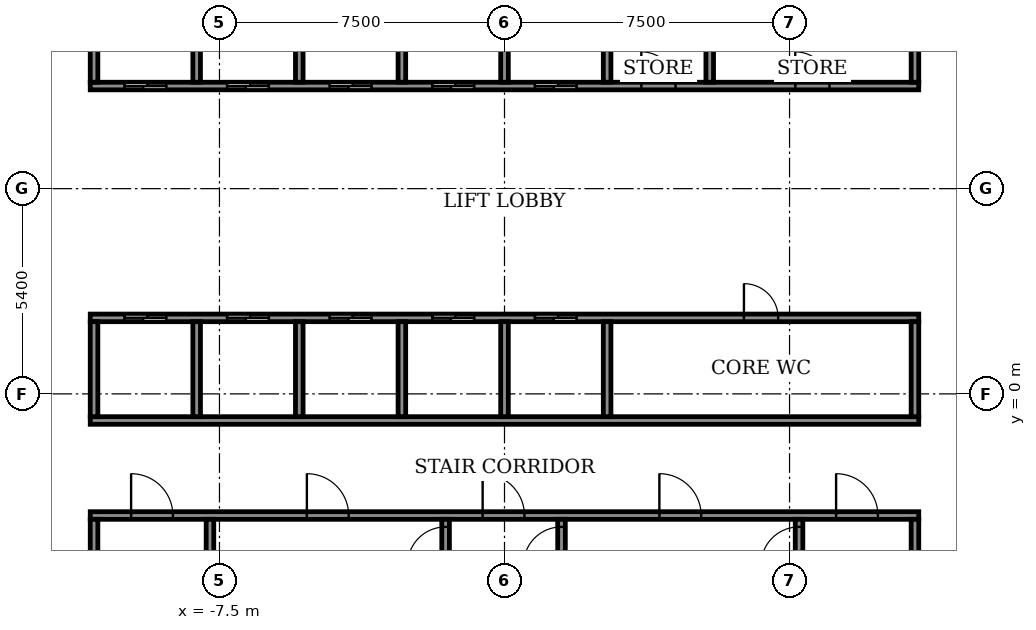
"""IFC4 building model, lengths in metres.
Left out: names, types, materials, properties, quantities, classifications, styles, units other than length and angle.
Written with IfcOpenShell. Run it as: python <this file> out.ifc"""

import sys

from ifc_helpers import new_model, si_unit, direction, frame, frame_2d, origin, place, context, subcontext, project, spatial, rectangle, extrude, element, fill, save


model = new_model("IFC4")
c1 = context("Model", 3, precision=1e-05, world=origin(), true_north=direction((0.0, 1.0)))
c2 = subcontext(c1, "Body", "Model", "MODEL_VIEW")
j1 = project(units=[si_unit("LENGTHUNIT", "METRE"), si_unit("PLANEANGLEUNIT", "RADIAN")], contexts=[c1])
p1 = place(None, origin())
s1 = spatial("IfcSite", under=j1, at=p1, CompositionType="ELEMENT")
p2 = place(p1, origin())
s2 = spatial("IfcBuilding", under=s1, at=p2, CompositionType="ELEMENT")
p3 = place(p2, frame((0.0, 0.0, 74.7)))
s3 = spatial("IfcBuildingStorey", under=s2, at=p3, CompositionType="ELEMENT", Elevation=74.7)
p4 = place(p3, frame((-10.9, -3.2, 0.0), z_axis=(0.0, 0.0, 1.0), x_axis=(1.0, 0.0, 0.0)))
e1 = element("IfcWall", 1, at=p4, inside=s3, PredefinedType="SHEAR", context=c2, shape_type="SweptSolid", body=[
    extrude(rectangle(XDim=21.8, YDim=0.2, at=frame_2d((10.9, 0.0))), origin(), (0.0, 0.0, 1.0), 4.05),
])
p5 = place(p4, frame((1.075, 0.0, 0.0)))
e2 = element("IfcOpeningElement", 2, at=p5, cuts=e1, PredefinedType="OPENING", context=c2, shape_type="SweptSolid", body=[
    extrude(rectangle(XDim=1.1, YDim=2.1, at=frame_2d((0.55, 1.05))), frame((0.0, 0.11, 0.0), z_axis=(0.0, -1.0, 0.0), x_axis=(1.0, 0.0, 0.0)), (0.0, 0.0, 1.0), 0.22),
])
p6 = place(p4, frame((10.325, 0.0, 0.0)))
e3 = element("IfcOpeningElement", 3, at=p6, cuts=e1, PredefinedType="OPENING", context=c2, shape_type="SweptSolid", body=[
    extrude(rectangle(XDim=1.1, YDim=2.1, at=frame_2d((0.55, 1.05))), frame((0.0, 0.11, 0.0), z_axis=(0.0, -1.0, 0.0), x_axis=(1.0, 0.0, 0.0)), (0.0, 0.0, 1.0), 0.22),
])
p7 = place(p4, frame((19.625, 0.0, 0.0)))
e4 = element("IfcOpeningElement", 4, at=p7, cuts=e1, PredefinedType="OPENING", context=c2, shape_type="SweptSolid", body=[
    extrude(rectangle(XDim=1.1, YDim=2.1, at=frame_2d((0.55, 1.05))), frame((0.0, 0.11, 0.0), z_axis=(0.0, -1.0, 0.0), x_axis=(1.0, 0.0, 0.0)), (0.0, 0.0, 1.0), 0.22),
])
p8 = place(p4, frame((5.7, 0.0, 0.0)))
e5 = element("IfcOpeningElement", 5, at=p8, cuts=e1, PredefinedType="OPENING", context=c2, shape_type="SweptSolid", body=[
    extrude(rectangle(XDim=1.1, YDim=2.1, at=frame_2d((0.55, 1.05))), frame((0.0, 0.11, 0.0), z_axis=(0.0, -1.0, 0.0), x_axis=(1.0, 0.0, 0.0)), (0.0, 0.0, 1.0), 0.22),
])
p9 = place(p4, frame((14.975, 0.0, 0.0)))
e6 = element("IfcOpeningElement", 6, at=p9, cuts=e1, PredefinedType="OPENING", context=c2, shape_type="SweptSolid", body=[
    extrude(rectangle(XDim=1.1, YDim=2.1, at=frame_2d((0.55, 1.05))), frame((0.0, 0.11, 0.0), z_axis=(0.0, -1.0, 0.0), x_axis=(1.0, 0.0, 0.0)), (0.0, 0.0, 1.0), 0.22),
])
p10 = place(p3, frame((-10.9, -0.7, 0.0), z_axis=(0.0, 0.0, 1.0), x_axis=(1.0, 0.0, 0.0)))
e7 = element("IfcWall", 7, at=p10, inside=s3, PredefinedType="SHEAR", context=c2, shape_type="SweptSolid", body=[
    extrude(rectangle(XDim=21.8, YDim=0.2, at=frame_2d((10.9, 0.0))), origin(), (0.0, 0.0, 1.0), 4.05),
])
p11 = place(p3, frame((-10.9, 2.0, 0.0), z_axis=(0.0, 0.0, 1.0), x_axis=(1.0, 0.0, 0.0)))
e8 = element("IfcWall", 8, at=p11, inside=s3, PredefinedType="SHEAR", context=c2, shape_type="SweptSolid", body=[
    extrude(rectangle(XDim=21.8, YDim=0.2, at=frame_2d((10.9, 0.0))), origin(), (0.0, 0.0, 1.0), 4.05),
])
p12 = place(p11, frame((0.9, 0.0, 0.0)))
e9 = element("IfcOpeningElement", 9, at=p12, cuts=e8, PredefinedType="OPENING", context=c2, shape_type="SweptSolid", body=[
    extrude(rectangle(XDim=1.1, YDim=2.1, at=frame_2d((0.55, 1.05))), frame((0.0, 0.11, 0.0), z_axis=(0.0, -1.0, 0.0), x_axis=(1.0, 0.0, 0.0)), (0.0, 0.0, 1.0), 0.22),
])
p13 = place(p11, frame((3.6, 0.0, 0.0)))
e10 = element("IfcOpeningElement", 10, at=p13, cuts=e8, PredefinedType="OPENING", context=c2, shape_type="SweptSolid", body=[
    extrude(rectangle(XDim=1.1, YDim=2.1, at=frame_2d((0.55, 1.05))), frame((0.0, 0.11, 0.0), z_axis=(0.0, -1.0, 0.0), x_axis=(1.0, 0.0, 0.0)), (0.0, 0.0, 1.0), 0.22),
])
p14 = place(p11, frame((6.3, 0.0, 0.0)))
e11 = element("IfcOpeningElement", 11, at=p14, cuts=e8, PredefinedType="OPENING", context=c2, shape_type="SweptSolid", body=[
    extrude(rectangle(XDim=1.1, YDim=2.1, at=frame_2d((0.55, 1.05))), frame((0.0, 0.11, 0.0), z_axis=(0.0, -1.0, 0.0), x_axis=(1.0, 0.0, 0.0)), (0.0, 0.0, 1.0), 0.22),
])
p15 = place(p11, frame((9.0, 0.0, 0.0)))
e12 = element("IfcOpeningElement", 12, at=p15, cuts=e8, PredefinedType="OPENING", context=c2, shape_type="SweptSolid", body=[
    extrude(rectangle(XDim=1.1, YDim=2.1, at=frame_2d((0.55, 1.05))), frame((0.0, 0.11, 0.0), z_axis=(0.0, -1.0, 0.0), x_axis=(1.0, 0.0, 0.0)), (0.0, 0.0, 1.0), 0.22),
])
p16 = place(p11, frame((11.7, 0.0, 0.0)))
e13 = element("IfcOpeningElement", 13, at=p16, cuts=e8, PredefinedType="OPENING", context=c2, shape_type="SweptSolid", body=[
    extrude(rectangle(XDim=1.1, YDim=2.1, at=frame_2d((0.55, 1.05))), frame((0.0, 0.11, 0.0), z_axis=(0.0, -1.0, 0.0), x_axis=(1.0, 0.0, 0.0)), (0.0, 0.0, 1.0), 0.22),
])
p17 = place(p11, frame((17.2, 0.0, 0.0)))
e14 = element("IfcOpeningElement", 14, at=p17, cuts=e8, PredefinedType="OPENING", context=c2, shape_type="SweptSolid", body=[
    extrude(rectangle(XDim=0.9, YDim=2.1, at=frame_2d((0.45, 1.05))), frame((0.0, 0.11, 0.0), z_axis=(0.0, -1.0, 0.0), x_axis=(1.0, 0.0, 0.0)), (0.0, 0.0, 1.0), 0.22),
])
p18 = place(p3, frame((-10.9, 8.1, 0.0), z_axis=(0.0, 0.0, 1.0), x_axis=(1.0, 0.0, 0.0)))
e15 = element("IfcWall", 15, at=p18, inside=s3, PredefinedType="SHEAR", context=c2, shape_type="SweptSolid", body=[
    extrude(rectangle(XDim=21.8, YDim=0.2, at=frame_2d((10.9, 0.0))), origin(), (0.0, 0.0, 1.0), 4.05),
])
p19 = place(p18, frame((0.9, 0.0, 0.0)))
e16 = element("IfcOpeningElement", 16, at=p19, cuts=e15, PredefinedType="OPENING", context=c2, shape_type="SweptSolid", body=[
    extrude(rectangle(XDim=1.1, YDim=2.1, at=frame_2d((0.55, 1.05))), frame((0.0, 0.11, 0.0), z_axis=(0.0, -1.0, 0.0), x_axis=(1.0, 0.0, 0.0)), (0.0, 0.0, 1.0), 0.22),
])
p20 = place(p18, frame((3.6, 0.0, 0.0)))
e17 = element("IfcOpeningElement", 17, at=p20, cuts=e15, PredefinedType="OPENING", context=c2, shape_type="SweptSolid", body=[
    extrude(rectangle(XDim=1.1, YDim=2.1, at=frame_2d((0.55, 1.05))), frame((0.0, 0.11, 0.0), z_axis=(0.0, -1.0, 0.0), x_axis=(1.0, 0.0, 0.0)), (0.0, 0.0, 1.0), 0.22),
])
p21 = place(p18, frame((6.3, 0.0, 0.0)))
e18 = element("IfcOpeningElement", 18, at=p21, cuts=e15, PredefinedType="OPENING", context=c2, shape_type="SweptSolid", body=[
    extrude(rectangle(XDim=1.1, YDim=2.1, at=frame_2d((0.55, 1.05))), frame((0.0, 0.11, 0.0), z_axis=(0.0, -1.0, 0.0), x_axis=(1.0, 0.0, 0.0)), (0.0, 0.0, 1.0), 0.22),
])
p22 = place(p18, frame((9.0, 0.0, 0.0)))
e19 = element("IfcOpeningElement", 19, at=p22, cuts=e15, PredefinedType="OPENING", context=c2, shape_type="SweptSolid", body=[
    extrude(rectangle(XDim=1.1, YDim=2.1, at=frame_2d((0.55, 1.05))), frame((0.0, 0.11, 0.0), z_axis=(0.0, -1.0, 0.0), x_axis=(1.0, 0.0, 0.0)), (0.0, 0.0, 1.0), 0.22),
])
p23 = place(p18, frame((11.7, 0.0, 0.0)))
e20 = element("IfcOpeningElement", 20, at=p23, cuts=e15, PredefinedType="OPENING", context=c2, shape_type="SweptSolid", body=[
    extrude(rectangle(XDim=1.1, YDim=2.1, at=frame_2d((0.55, 1.05))), frame((0.0, 0.11, 0.0), z_axis=(0.0, -1.0, 0.0), x_axis=(1.0, 0.0, 0.0)), (0.0, 0.0, 1.0), 0.22),
])
p24 = place(p18, frame((14.5, 0.0, 0.0)))
e21 = element("IfcOpeningElement", 21, at=p24, cuts=e15, PredefinedType="OPENING", context=c2, shape_type="SweptSolid", body=[
    extrude(rectangle(XDim=0.9, YDim=2.1, at=frame_2d((0.45, 1.05))), frame((0.0, 0.11, 0.0), z_axis=(0.0, -1.0, 0.0), x_axis=(1.0, 0.0, 0.0)), (0.0, 0.0, 1.0), 0.22),
])
p25 = place(p18, frame((18.55, 0.0, 0.0)))
e22 = element("IfcOpeningElement", 22, at=p25, cuts=e15, PredefinedType="OPENING", context=c2, shape_type="SweptSolid", body=[
    extrude(rectangle(XDim=0.9, YDim=2.1, at=frame_2d((0.45, 1.05))), frame((0.0, 0.11, 0.0), z_axis=(0.0, -1.0, 0.0), x_axis=(1.0, 0.0, 0.0)), (0.0, 0.0, 1.0), 0.22),
])
for number, where, z_axis, x_axis in (
    (23, (-10.8, -10.8, 0.0), (0.0, 0.0, 1.0), (0.0, 1.0, 0.0)),
    (24, (-7.75, -10.8, 0.0), (0.0, 0.0, 1.0), (0.0, 1.0, 0.0)),
):
    element("IfcWall", number, at=place(p3, frame(where, z_axis=z_axis, x_axis=x_axis)), inside=s3, PredefinedType="SHEAR", context=c2, shape_type="SweptSolid", body=[
        extrude(rectangle(XDim=7.5, YDim=0.2, at=frame_2d((3.75, 0.0))), origin(), (0.0, 0.0, 1.0), 4.05),
    ])
p26 = place(p3, frame((-1.55, -10.8, 0.0), z_axis=(0.0, 0.0, 1.0), x_axis=(0.0, 1.0, 0.0)))
e25 = element("IfcWall", 25, at=p26, inside=s3, PredefinedType="SHEAR", context=c2, shape_type="SweptSolid", body=[
    extrude(rectangle(XDim=7.5, YDim=0.2, at=frame_2d((3.75, 0.0))), origin(), (0.0, 0.0, 1.0), 4.05),
])
p27 = place(p26, frame((6.3, 0.0, 0.0)))
e26 = element("IfcOpeningElement", 26, at=p27, cuts=e25, PredefinedType="OPENING", context=c2, shape_type="SweptSolid", body=[
    extrude(rectangle(XDim=1.0, YDim=2.1, at=frame_2d((0.5, 1.05))), frame((0.0, 0.11, 0.0), z_axis=(0.0, -1.0, 0.0), x_axis=(1.0, 0.0, 0.0)), (0.0, 0.0, 1.0), 0.22),
])
p28 = place(p3, frame((1.5, -10.8, 0.0), z_axis=(0.0, 0.0, 1.0), x_axis=(0.0, 1.0, 0.0)))
e27 = element("IfcWall", 27, at=p28, inside=s3, PredefinedType="SHEAR", context=c2, shape_type="SweptSolid", body=[
    extrude(rectangle(XDim=7.5, YDim=0.2, at=frame_2d((3.75, 0.0))), origin(), (0.0, 0.0, 1.0), 4.05),
])
p29 = place(p28, frame((6.3, 0.0, 0.0)))
e28 = element("IfcOpeningElement", 28, at=p29, cuts=e27, PredefinedType="OPENING", context=c2, shape_type="SweptSolid", body=[
    extrude(rectangle(XDim=1.0, YDim=2.1, at=frame_2d((0.5, 1.05))), frame((0.0, 0.11, 0.0), z_axis=(0.0, -1.0, 0.0), x_axis=(1.0, 0.0, 0.0)), (0.0, 0.0, 1.0), 0.22),
])
p30 = place(p3, frame((7.75, -10.8, 0.0), z_axis=(0.0, 0.0, 1.0), x_axis=(0.0, 1.0, 0.0)))
e29 = element("IfcWall", 29, at=p30, inside=s3, PredefinedType="SHEAR", context=c2, shape_type="SweptSolid", body=[
    extrude(rectangle(XDim=7.5, YDim=0.2, at=frame_2d((3.75, 0.0))), origin(), (0.0, 0.0, 1.0), 4.05),
])
p31 = place(p30, frame((6.3, 0.0, 0.0)))
e30 = element("IfcOpeningElement", 30, at=p31, cuts=e29, PredefinedType="OPENING", context=c2, shape_type="SweptSolid", body=[
    extrude(rectangle(XDim=1.0, YDim=2.1, at=frame_2d((0.5, 1.05))), frame((0.0, 0.11, 0.0), z_axis=(0.0, -1.0, 0.0), x_axis=(1.0, 0.0, 0.0)), (0.0, 0.0, 1.0), 0.22),
])
p32 = place(p3, frame((10.8, -10.8, 0.0), z_axis=(0.0, 0.0, 1.0), x_axis=(0.0, 1.0, 0.0)))
e31 = element("IfcWall", 31, at=p32, inside=s3, PredefinedType="SHEAR", context=c2, shape_type="SweptSolid", body=[
    extrude(rectangle(XDim=7.5, YDim=0.2, at=frame_2d((3.75, 0.0))), origin(), (0.0, 0.0, 1.0), 4.05),
])
for number, where, z_axis, x_axis in (
    (32, (-10.8, -0.6, 0.0), (0.0, 0.0, 1.0), (0.0, 1.0, 0.0)),
    (33, (-8.1, -0.6, 0.0), (0.0, 0.0, 1.0), (0.0, 1.0, 0.0)),
    (34, (-5.4, -0.6, 0.0), (0.0, 0.0, 1.0), (0.0, 1.0, 0.0)),
    (35, (-2.7, -0.6, 0.0), (0.0, 0.0, 1.0), (0.0, 1.0, 0.0)),
    (36, (0.0, -0.6, 0.0), (0.0, 0.0, 1.0), (0.0, 1.0, 0.0)),
    (37, (2.7, -0.6, 0.0), (0.0, 0.0, 1.0), (0.0, 1.0, 0.0)),
):
    element("IfcWall", number, at=place(p3, frame(where, z_axis=z_axis, x_axis=x_axis)), inside=s3, PredefinedType="SHEAR", context=c2, shape_type="SweptSolid", body=[
        extrude(rectangle(XDim=2.5, YDim=0.2, at=frame_2d((1.25, 0.0))), origin(), (0.0, 0.0, 1.0), 4.05),
    ])
p33 = place(p3, frame((10.8, -0.6, 0.0), z_axis=(0.0, 0.0, 1.0), x_axis=(0.0, 1.0, 0.0)))
e38 = element("IfcWall", 38, at=p33, inside=s3, PredefinedType="STANDARD", context=c2, shape_type="SweptSolid", body=[
    extrude(rectangle(XDim=2.5, YDim=0.2, at=frame_2d((1.25, 0.0))), origin(), (0.0, 0.0, 1.0), 4.05),
])
for number, where, z_axis, x_axis in (
    (39, (-10.8, 8.2, 0.0), (0.0, 0.0, 1.0), (0.0, 1.0, 0.0)),
    (40, (-8.1, 8.2, 0.0), (0.0, 0.0, 1.0), (0.0, 1.0, 0.0)),
    (41, (-5.4, 8.2, 0.0), (0.0, 0.0, 1.0), (0.0, 1.0, 0.0)),
    (42, (-2.7, 8.2, 0.0), (0.0, 0.0, 1.0), (0.0, 1.0, 0.0)),
    (43, (0.0, 8.2, 0.0), (0.0, 0.0, 1.0), (0.0, 1.0, 0.0)),
    (44, (2.7, 8.2, 0.0), (0.0, 0.0, 1.0), (0.0, 1.0, 0.0)),
):
    element("IfcWall", number, at=place(p3, frame(where, z_axis=z_axis, x_axis=x_axis)), inside=s3, PredefinedType="SHEAR", context=c2, shape_type="SweptSolid", body=[
        extrude(rectangle(XDim=2.6, YDim=0.2, at=frame_2d((1.3, 0.0))), origin(), (0.0, 0.0, 1.0), 4.05),
    ])
for number, where, z_axis, x_axis in (
    (45, (5.4, 8.2, 0.0), (0.0, 0.0, 1.0), (0.0, 1.0, 0.0)),
    (46, (10.8, 8.2, 0.0), (0.0, 0.0, 1.0), (0.0, 1.0, 0.0)),
):
    element("IfcWall", number, at=place(p3, frame(where, z_axis=z_axis, x_axis=x_axis)), inside=s3, PredefinedType="STANDARD", context=c2, shape_type="SweptSolid", body=[
        extrude(rectangle(XDim=2.6, YDim=0.2, at=frame_2d((1.3, 0.0))), origin(), (0.0, 0.0, 1.0), 4.05),
    ])
p34 = place(p12, origin())
e47 = element("IfcDoor", 47, at=p34, inside=s3, OperationType="SLIDING_TO_LEFT", PredefinedType="DOOR", context=c2, shape_type="SweptSolid", body=[
    extrude(rectangle(XDim=1.1, YDim=2.1, at=frame_2d((0.55, 1.05))), frame((0.0, 0.025, 0.0), z_axis=(0.0, -1.0, 0.0), x_axis=(1.0, 0.0, 0.0)), (0.0, 0.0, 1.0), 0.05),
])
fill(e9, e47)
p35 = place(p13, origin())
e48 = element("IfcDoor", 48, at=p35, inside=s3, OperationType="SLIDING_TO_LEFT", PredefinedType="DOOR", context=c2, shape_type="SweptSolid", body=[
    extrude(rectangle(XDim=1.1, YDim=2.1, at=frame_2d((0.55, 1.05))), frame((0.0, 0.025, 0.0), z_axis=(0.0, -1.0, 0.0), x_axis=(1.0, 0.0, 0.0)), (0.0, 0.0, 1.0), 0.05),
])
fill(e10, e48)
p36 = place(p14, origin())
e49 = element("IfcDoor", 49, at=p36, inside=s3, OperationType="SLIDING_TO_LEFT", PredefinedType="DOOR", context=c2, shape_type="SweptSolid", body=[
    extrude(rectangle(XDim=1.1, YDim=2.1, at=frame_2d((0.55, 1.05))), frame((0.0, 0.025, 0.0), z_axis=(0.0, -1.0, 0.0), x_axis=(1.0, 0.0, 0.0)), (0.0, 0.0, 1.0), 0.05),
])
fill(e11, e49)
p37 = place(p15, origin())
e50 = element("IfcDoor", 50, at=p37, inside=s3, OperationType="SLIDING_TO_LEFT", PredefinedType="DOOR", context=c2, shape_type="SweptSolid", body=[
    extrude(rectangle(XDim=1.1, YDim=2.1, at=frame_2d((0.55, 1.05))), frame((0.0, 0.025, 0.0), z_axis=(0.0, -1.0, 0.0), x_axis=(1.0, 0.0, 0.0)), (0.0, 0.0, 1.0), 0.05),
])
fill(e12, e50)
p38 = place(p16, origin())
e51 = element("IfcDoor", 51, at=p38, inside=s3, OperationType="SLIDING_TO_LEFT", PredefinedType="DOOR", context=c2, shape_type="SweptSolid", body=[
    extrude(rectangle(XDim=1.1, YDim=2.1, at=frame_2d((0.55, 1.05))), frame((0.0, 0.025, 0.0), z_axis=(0.0, -1.0, 0.0), x_axis=(1.0, 0.0, 0.0)), (0.0, 0.0, 1.0), 0.05),
])
fill(e13, e51)
p39 = place(p19, origin())
e52 = element("IfcDoor", 52, at=p39, inside=s3, OperationType="SLIDING_TO_LEFT", PredefinedType="DOOR", context=c2, shape_type="SweptSolid", body=[
    extrude(rectangle(XDim=1.1, YDim=2.1, at=frame_2d((0.55, 1.05))), frame((0.0, 0.025, 0.0), z_axis=(0.0, -1.0, 0.0), x_axis=(1.0, 0.0, 0.0)), (0.0, 0.0, 1.0), 0.05),
])
fill(e16, e52)
p40 = place(p20, origin())
e53 = element("IfcDoor", 53, at=p40, inside=s3, OperationType="SLIDING_TO_LEFT", PredefinedType="DOOR", context=c2, shape_type="SweptSolid", body=[
    extrude(rectangle(XDim=1.1, YDim=2.1, at=frame_2d((0.55, 1.05))), frame((0.0, 0.025, 0.0), z_axis=(0.0, -1.0, 0.0), x_axis=(1.0, 0.0, 0.0)), (0.0, 0.0, 1.0), 0.05),
])
fill(e17, e53)
p41 = place(p21, origin())
e54 = element("IfcDoor", 54, at=p41, inside=s3, OperationType="SLIDING_TO_LEFT", PredefinedType="DOOR", context=c2, shape_type="SweptSolid", body=[
    extrude(rectangle(XDim=1.1, YDim=2.1, at=frame_2d((0.55, 1.05))), frame((0.0, 0.025, 0.0), z_axis=(0.0, -1.0, 0.0), x_axis=(1.0, 0.0, 0.0)), (0.0, 0.0, 1.0), 0.05),
])
fill(e18, e54)
p42 = place(p22, origin())
e55 = element("IfcDoor", 55, at=p42, inside=s3, OperationType="SLIDING_TO_LEFT", PredefinedType="DOOR", context=c2, shape_type="SweptSolid", body=[
    extrude(rectangle(XDim=1.1, YDim=2.1, at=frame_2d((0.55, 1.05))), frame((0.0, 0.025, 0.0), z_axis=(0.0, -1.0, 0.0), x_axis=(1.0, 0.0, 0.0)), (0.0, 0.0, 1.0), 0.05),
])
fill(e19, e55)
p43 = place(p23, origin())
e56 = element("IfcDoor", 56, at=p43, inside=s3, OperationType="SLIDING_TO_LEFT", PredefinedType="DOOR", context=c2, shape_type="SweptSolid", body=[
    extrude(rectangle(XDim=1.1, YDim=2.1, at=frame_2d((0.55, 1.05))), frame((0.0, 0.025, 0.0), z_axis=(0.0, -1.0, 0.0), x_axis=(1.0, 0.0, 0.0)), (0.0, 0.0, 1.0), 0.05),
])
fill(e20, e56)
p44 = place(p17, origin())
e57 = element("IfcDoor", 57, at=p44, inside=s3, OperationType="SINGLE_SWING_RIGHT", PredefinedType="DOOR", context=c2, shape_type="SweptSolid", body=[
    extrude(rectangle(XDim=0.9, YDim=2.1, at=frame_2d((0.45, 1.05))), frame((0.0, 0.025, 0.0), z_axis=(0.0, -1.0, 0.0), x_axis=(1.0, 0.0, 0.0)), (0.0, 0.0, 1.0), 0.05),
])
fill(e14, e57)
p45 = place(p24, origin())
e58 = element("IfcDoor", 58, at=p45, inside=s3, OperationType="SINGLE_SWING_RIGHT", PredefinedType="DOOR", context=c2, shape_type="SweptSolid", body=[
    extrude(rectangle(XDim=0.9, YDim=2.1, at=frame_2d((0.45, 1.05))), frame((0.0, 0.025, 0.0), z_axis=(0.0, -1.0, 0.0), x_axis=(1.0, 0.0, 0.0)), (0.0, 0.0, 1.0), 0.05),
])
fill(e21, e58)
p46 = place(p25, origin())
e59 = element("IfcDoor", 59, at=p46, inside=s3, OperationType="SINGLE_SWING_RIGHT", PredefinedType="DOOR", context=c2, shape_type="SweptSolid", body=[
    extrude(rectangle(XDim=0.9, YDim=2.1, at=frame_2d((0.45, 1.05))), frame((0.0, 0.025, 0.0), z_axis=(0.0, -1.0, 0.0), x_axis=(1.0, 0.0, 0.0)), (0.0, 0.0, 1.0), 0.05),
])
fill(e22, e59)
p47 = place(p5, origin())
e60 = element("IfcDoor", 60, at=p47, inside=s3, OperationType="SINGLE_SWING_RIGHT", PredefinedType="DOOR", context=c2, shape_type="SweptSolid", body=[
    extrude(rectangle(XDim=1.1, YDim=2.1, at=frame_2d((0.55, 1.05))), frame((0.0, 0.025, 0.0), z_axis=(0.0, -1.0, 0.0), x_axis=(1.0, 0.0, 0.0)), (0.0, 0.0, 1.0), 0.05),
])
fill(e2, e60)
p48 = place(p6, origin())
e61 = element("IfcDoor", 61, at=p48, inside=s3, OperationType="SINGLE_SWING_RIGHT", PredefinedType="DOOR", context=c2, shape_type="SweptSolid", body=[
    extrude(rectangle(XDim=1.1, YDim=2.1, at=frame_2d((0.55, 1.05))), frame((0.0, 0.025, 0.0), z_axis=(0.0, -1.0, 0.0), x_axis=(1.0, 0.0, 0.0)), (0.0, 0.0, 1.0), 0.05),
])
fill(e3, e61)
p49 = place(p7, origin())
e62 = element("IfcDoor", 62, at=p49, inside=s3, OperationType="SINGLE_SWING_RIGHT", PredefinedType="DOOR", context=c2, shape_type="SweptSolid", body=[
    extrude(rectangle(XDim=1.1, YDim=2.1, at=frame_2d((0.55, 1.05))), frame((0.0, 0.025, 0.0), z_axis=(0.0, -1.0, 0.0), x_axis=(1.0, 0.0, 0.0)), (0.0, 0.0, 1.0), 0.05),
])
fill(e4, e62)
p50 = place(p8, origin())
e63 = element("IfcDoor", 63, at=p50, inside=s3, OperationType="SINGLE_SWING_LEFT", PredefinedType="DOOR", context=c2, shape_type="SweptSolid", body=[
    extrude(rectangle(XDim=1.1, YDim=2.1, at=frame_2d((0.55, 1.05))), frame((0.0, 0.025, 0.0), z_axis=(0.0, -1.0, 0.0), x_axis=(1.0, 0.0, 0.0)), (0.0, 0.0, 1.0), 0.05),
])
fill(e5, e63)
p51 = place(p9, origin())
e64 = element("IfcDoor", 64, at=p51, inside=s3, OperationType="SINGLE_SWING_LEFT", PredefinedType="DOOR", context=c2, shape_type="SweptSolid", body=[
    extrude(rectangle(XDim=1.1, YDim=2.1, at=frame_2d((0.55, 1.05))), frame((0.0, 0.025, 0.0), z_axis=(0.0, -1.0, 0.0), x_axis=(1.0, 0.0, 0.0)), (0.0, 0.0, 1.0), 0.05),
])
fill(e6, e64)
p52 = place(p27, origin())
e65 = element("IfcDoor", 65, at=p52, inside=s3, OperationType="SINGLE_SWING_RIGHT", PredefinedType="DOOR", context=c2, shape_type="SweptSolid", body=[
    extrude(rectangle(XDim=1.0, YDim=2.1, at=frame_2d((0.5, 1.05))), frame((0.0, 0.025, 0.0), z_axis=(0.0, -1.0, 0.0), x_axis=(1.0, 0.0, 0.0)), (0.0, 0.0, 1.0), 0.05),
])
fill(e26, e65)
p53 = place(p29, origin())
e66 = element("IfcDoor", 66, at=p53, inside=s3, OperationType="SINGLE_SWING_RIGHT", PredefinedType="DOOR", context=c2, shape_type="SweptSolid", body=[
    extrude(rectangle(XDim=1.0, YDim=2.1, at=frame_2d((0.5, 1.05))), frame((0.0, 0.025, 0.0), z_axis=(0.0, -1.0, 0.0), x_axis=(1.0, 0.0, 0.0)), (0.0, 0.0, 1.0), 0.05),
])
fill(e28, e66)
p54 = place(p31, origin())
e67 = element("IfcDoor", 67, at=p54, inside=s3, OperationType="SINGLE_SWING_RIGHT", PredefinedType="DOOR", context=c2, shape_type="SweptSolid", body=[
    extrude(rectangle(XDim=1.0, YDim=2.1, at=frame_2d((0.5, 1.05))), frame((0.0, 0.025, 0.0), z_axis=(0.0, -1.0, 0.0), x_axis=(1.0, 0.0, 0.0)), (0.0, 0.0, 1.0), 0.05),
])
fill(e30, e67)
save(model, sys.argv[1])
